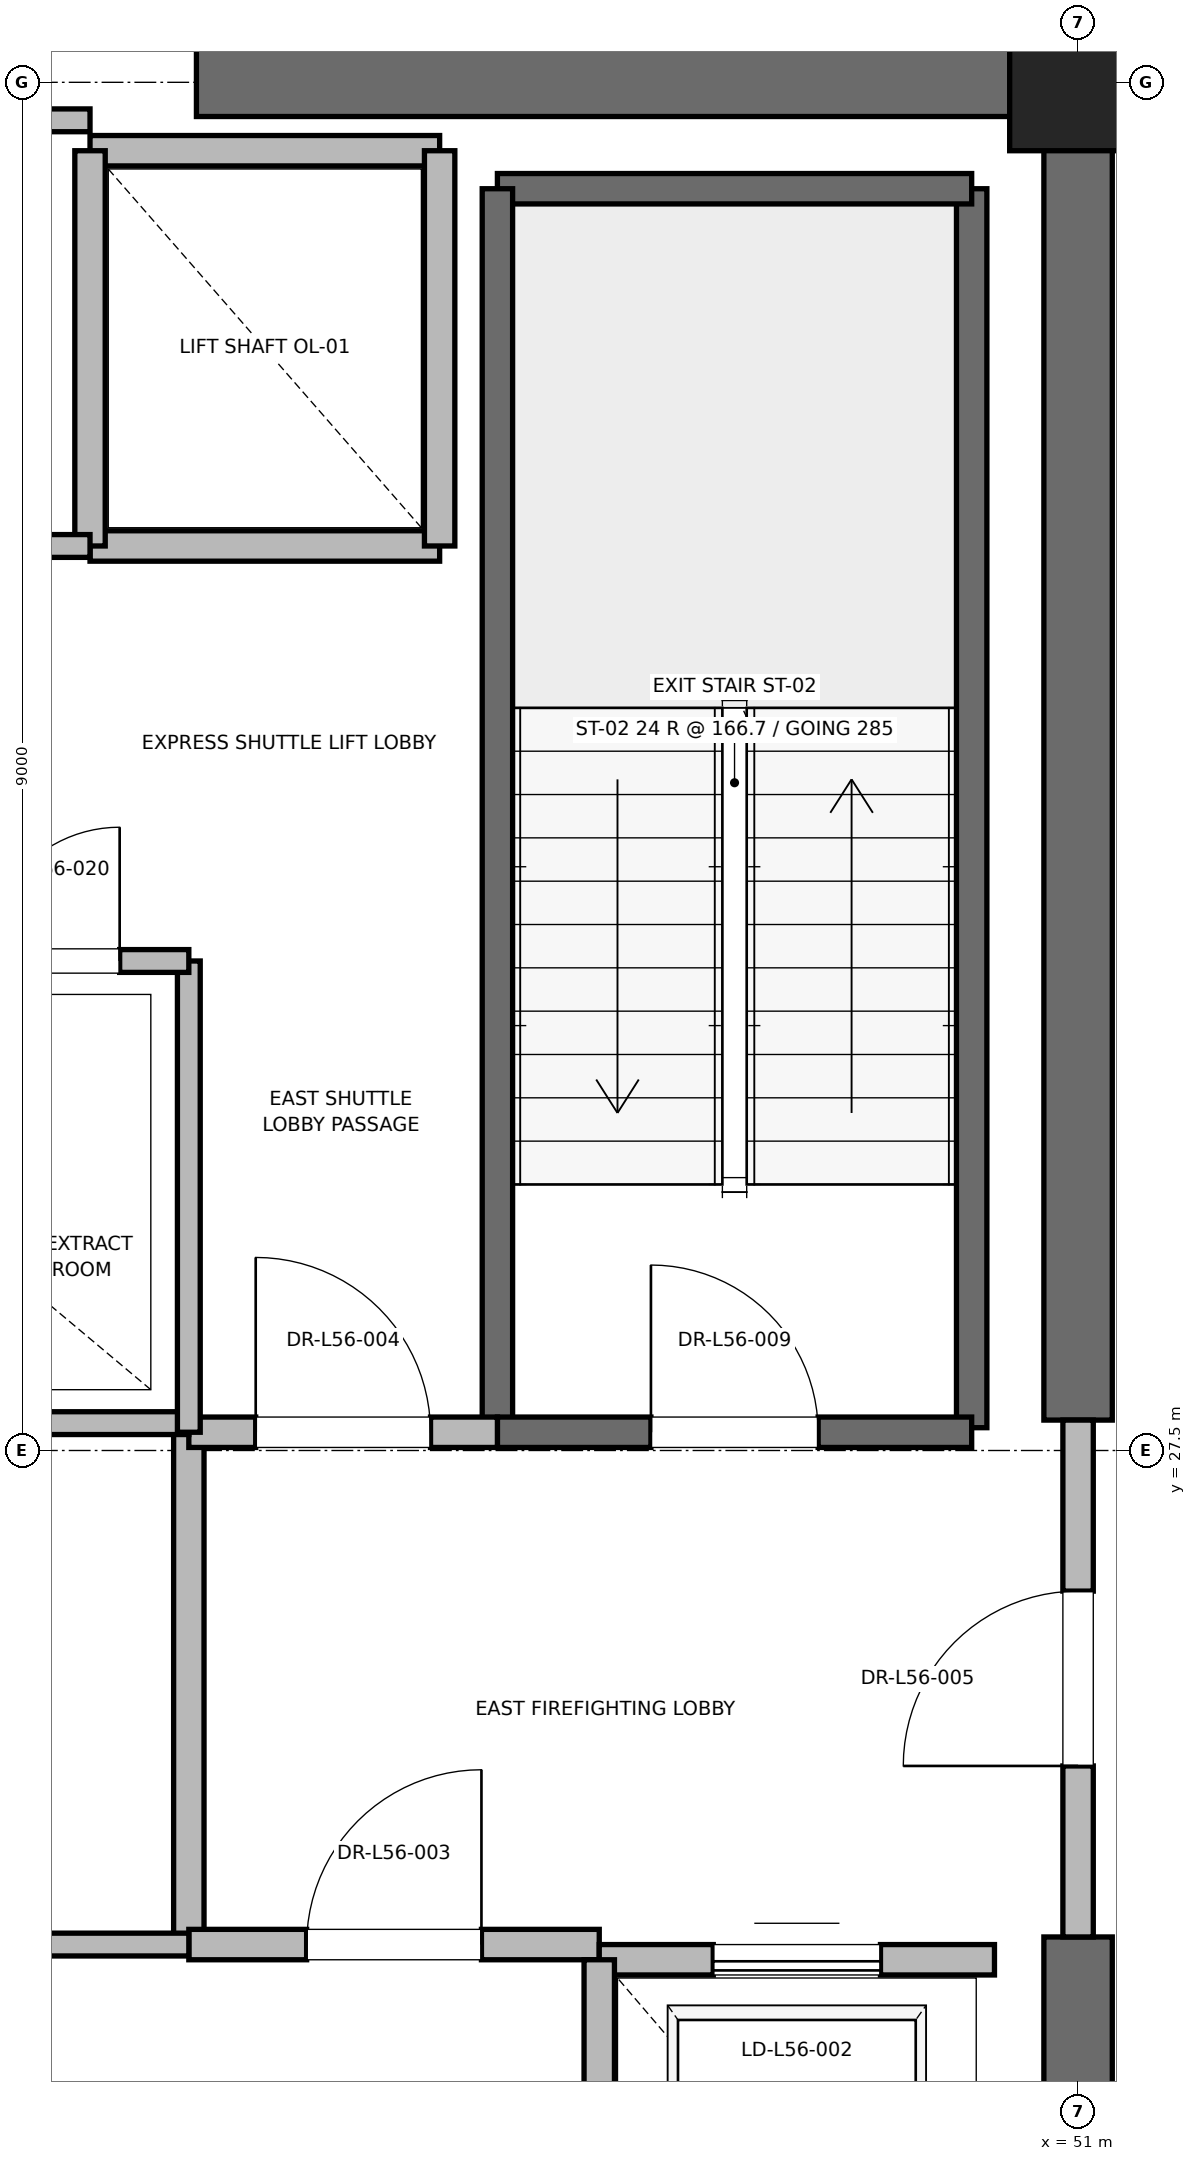
"""IFC4 building model, lengths in metres.
Left out: names, types, materials, properties, quantities, classifications, styles, units other than length and angle.
Written with IfcOpenShell. Run it as: python <this file> out.ifc"""

import sys

from ifc_helpers import new_model, si_unit, direction, frame, frame_2d, origin, origin_2d, place, context, subcontext, project, spatial, rectangle, extrude, element, fill, save


model = new_model("IFC4")
c1 = context("Model", 3, precision=1e-05, world=origin(), true_north=direction((0.0, 1.0)))
c2 = subcontext(c1, "Body", "Model", "MODEL_VIEW")
j1 = project(units=[si_unit("LENGTHUNIT", "METRE"), si_unit("PLANEANGLEUNIT", "RADIAN")], contexts=[c1])
p1 = place(None, origin())
s1 = spatial("IfcSite", under=j1, at=p1, CompositionType="ELEMENT")
p2 = place(p1, origin())
s2 = spatial("IfcBuilding", under=s1, at=p2, CompositionType="ELEMENT")
p3 = place(p2, frame((0.0, 0.0, 243.2)))
s3 = spatial("IfcBuildingStorey", under=s2, at=p3, CompositionType="ELEMENT", Elevation=243.2)
p4 = place(p3, frame((51.0, 36.5, 0.0), z_axis=(0.0, 0.0, 1.0), x_axis=(1.0, 0.0, 0.0)))
e1 = element("IfcColumn", 1, at=p4, inside=s3, PredefinedType="PILASTER", context=c2, shape_type="SweptSolid", body=[
    extrude(rectangle(XDim=0.9, YDim=0.9, at=origin_2d()), origin(), (0.0, 0.0, 1.0), 4.0),
])
for number, where, z_axis, x_axis in (
    (2, (45.2, 36.5, 0.0), (0.0, 0.0, 1.0), (1.0, 0.0, 0.0)),
    (3, (51.0, 18.5, 0.0), (0.0, 0.0, 1.0), (0.0, 1.0, 0.0)),
):
    element("IfcWall", number, at=place(p3, frame(where, z_axis=z_axis, x_axis=x_axis)), inside=s3, PredefinedType="SHEAR", context=c2, shape_type="SweptSolid", body=[
        extrude(rectangle(XDim=5.8, YDim=0.45, at=frame_2d((2.9, 0.0))), origin(), (0.0, 0.0, 1.0), 3.785),
    ])
p5 = place(p3, frame((51.0, 27.7, 0.0), z_axis=(0.0, 0.0, 1.0), x_axis=(0.0, 1.0, 0.0)))
e4 = element("IfcWall", 4, at=p5, inside=s3, PredefinedType="SHEAR", context=c2, shape_type="SweptSolid", body=[
    extrude(rectangle(XDim=8.8, YDim=0.45, at=frame_2d((4.4, 0.0))), origin(), (0.0, 0.0, 1.0), 3.785),
])
p6 = place(p3, frame((50.3, 27.65, 0.0), z_axis=(0.0, 0.0, 1.0), x_axis=(0.0, 1.0, 0.0)))
e5 = element("IfcWall", 5, at=p6, inside=s3, PredefinedType="SOLIDWALL", context=c2, shape_type="SweptSolid", body=[
    extrude(rectangle(XDim=8.15, YDim=0.2, at=frame_2d((4.075, 0.0))), origin(), (0.0, 0.0, 1.0), 3.785),
])
p7 = place(p3, frame((47.18, 35.8, 0.0), z_axis=(0.0, 0.0, 1.0), x_axis=(1.0, 0.0, 0.0)))
e6 = element("IfcWall", 6, at=p7, inside=s3, PredefinedType="SOLIDWALL", context=c2, shape_type="SweptSolid", body=[
    extrude(rectangle(XDim=3.12, YDim=0.2, at=frame_2d((1.56, 0.0))), origin(), (0.0, 0.0, 1.0), 3.785),
])
p8 = place(p3, frame((47.18, 27.62, 0.0), z_axis=(0.0, 0.0, 1.0), x_axis=(0.0, 1.0, 0.0)))
e7 = element("IfcWall", 7, at=p8, inside=s3, PredefinedType="SOLIDWALL", context=c2, shape_type="SweptSolid", body=[
    extrude(rectangle(XDim=8.18, YDim=0.2, at=frame_2d((4.09, 0.0))), origin(), (0.0, 0.0, 1.0), 3.785),
])
p9 = place(p3, frame((47.18, 27.62, 0.0), z_axis=(0.0, 0.0, 1.0), x_axis=(1.0, 0.0, 0.0)))
e8 = element("IfcWall", 8, at=p9, inside=s3, PredefinedType="SOLIDWALL", context=c2, shape_type="SweptSolid", body=[
    extrude(rectangle(XDim=3.12, YDim=0.2, at=frame_2d((1.56, 0.0))), origin(), (0.0, 0.0, 1.0), 3.785),
])
p10 = place(p9, frame((1.01, 0.0, 0.0)))
e9 = element("IfcOpeningElement", 9, at=p10, cuts=e8, PredefinedType="OPENING", context=c2, shape_type="SweptSolid", body=[
    extrude(rectangle(XDim=1.1, YDim=2.15, at=frame_2d((0.55, 1.075))), frame((0.0, 0.1, 0.0), z_axis=(0.0, -1.0, 0.0), x_axis=(1.0, 0.0, 0.0)), (0.0, 0.0, 1.0), 0.2),
])
p11 = place(p3, frame((45.15, 24.25, 0.0), z_axis=(0.0, 0.0, 1.0), x_axis=(0.0, 1.0, 0.0)))
e10 = element("IfcWall", 10, at=p11, inside=s3, PredefinedType="PARTITIONING", context=c2, shape_type="SweptSolid", body=[
    extrude(rectangle(XDim=3.37, YDim=0.2, at=frame_2d((1.685, 0.0))), origin(), (0.0, 0.0, 1.0), 3.785),
])
p12 = place(p3, frame((45.15, 24.25, 0.0), z_axis=(0.0, 0.0, 1.0), x_axis=(1.0, 0.0, 0.0)))
e11 = element("IfcWall", 11, at=p12, inside=s3, PredefinedType="PARTITIONING", context=c2, shape_type="SweptSolid", body=[
    extrude(rectangle(XDim=2.7, YDim=0.2, at=frame_2d((1.35, 0.0))), origin(), (0.0, 0.0, 1.0), 3.785),
])
p13 = place(p12, frame((0.775, 0.0, 0.0)))
e12 = element("IfcOpeningElement", 12, at=p13, cuts=e11, PredefinedType="OPENING", context=c2, shape_type="SweptSolid", body=[
    extrude(rectangle(XDim=1.15, YDim=2.2, at=frame_2d((0.575, 1.1))), frame((0.0, 0.1, 0.0), z_axis=(0.0, -1.0, 0.0), x_axis=(1.0, 0.0, 0.0)), (0.0, 0.0, 1.0), 0.2),
])
p14 = place(p3, frame((45.15, 27.62, 0.0), z_axis=(0.0, 0.0, 1.0), x_axis=(1.0, 0.0, 0.0)))
e13 = element("IfcWall", 13, at=p14, inside=s3, PredefinedType="PARTITIONING", context=c2, shape_type="SweptSolid", body=[
    extrude(rectangle(XDim=2.03, YDim=0.2, at=frame_2d((1.015, 0.0))), origin(), (0.0, 0.0, 1.0), 3.785),
])
p15 = place(p14, frame((0.44, 0.0, 0.0)))
e14 = element("IfcOpeningElement", 14, at=p15, cuts=e13, PredefinedType="OPENING", context=c2, shape_type="SweptSolid", body=[
    extrude(rectangle(XDim=1.15, YDim=2.2, at=frame_2d((0.575, 1.1))), frame((0.0, 0.1, 0.0), z_axis=(0.0, -1.0, 0.0), x_axis=(1.0, 0.0, 0.0)), (0.0, 0.0, 1.0), 0.2),
])
p16 = place(p3, frame((51.0, 24.3, 0.0), z_axis=(0.0, 0.0, 1.0), x_axis=(0.0, 1.0, 0.0)))
e15 = element("IfcWall", 15, at=p16, inside=s3, PredefinedType="PARTITIONING", context=c2, shape_type="SweptSolid", body=[
    extrude(rectangle(XDim=3.4, YDim=0.2, at=frame_2d((1.7, 0.0))), origin(), (0.0, 0.0, 1.0), 2.865),
])
p17 = place(p16, frame((1.125, 0.0, 0.0)))
e16 = element("IfcOpeningElement", 16, at=p17, cuts=e15, PredefinedType="OPENING", context=c2, shape_type="SweptSolid", body=[
    extrude(rectangle(XDim=1.15, YDim=2.2, at=frame_2d((0.575, 1.1))), frame((0.0, 0.1, 0.0), z_axis=(0.0, -1.0, 0.0), x_axis=(1.0, 0.0, 0.0)), (0.0, 0.0, 1.0), 0.2),
])
p18 = place(p3, frame((50.45, 24.15, 0.0), z_axis=(0.0, 0.0, 1.0), x_axis=(-1.0, 0.0, 0.0)))
e17 = element("IfcWall", 17, at=p18, inside=s3, PredefinedType="SOLIDWALL", context=c2, shape_type="SweptSolid", body=[
    extrude(rectangle(XDim=2.6, YDim=0.2, at=frame_2d((1.3, 0.0))), origin(), (0.0, 0.0, 1.0), 2.865),
])
p19 = place(p18, frame((0.75, 0.0, 0.0)))
e18 = element("IfcOpeningElement", 18, at=p19, cuts=e17, PredefinedType="OPENING", context=c2, shape_type="SweptSolid", body=[
    extrude(rectangle(XDim=1.1, YDim=2.2, at=frame_2d((0.55, 1.1))), frame((0.0, 0.1, 0.0), z_axis=(0.0, -1.0, 0.0), x_axis=(1.0, 0.0, 0.0)), (0.0, 0.0, 1.0), 0.2),
])
p20 = place(p3, frame((47.85, 24.15, 0.0), z_axis=(0.0, 0.0, 1.0), x_axis=(0.0, -1.0, 0.0)))
e19 = element("IfcWall", 19, at=p20, inside=s3, PredefinedType="SOLIDWALL", context=c2, shape_type="SweptSolid", body=[
    extrude(rectangle(XDim=3.0, YDim=0.2, at=frame_2d((1.5, 0.0))), origin(), (0.0, 0.0, 1.0), 3.785),
])
p21 = place(p3, frame((44.5, 33.45, 0.0), z_axis=(0.0, 0.0, 1.0), x_axis=(1.0, 0.0, 0.0)))
e20 = element("IfcWall", 20, at=p21, inside=s3, PredefinedType="SOLIDWALL", context=c2, shape_type="SweptSolid", body=[
    extrude(rectangle(XDim=2.3, YDim=0.2, at=frame_2d((1.15, 0.0))), origin(), (0.0, 0.0, 1.0), 3.785),
])
p22 = place(p3, frame((46.8, 36.05, 0.0), z_axis=(0.0, 0.0, 1.0), x_axis=(-1.0, 0.0, 0.0)))
e21 = element("IfcWall", 21, at=p22, inside=s3, PredefinedType="SOLIDWALL", context=c2, shape_type="SweptSolid", body=[
    extrude(rectangle(XDim=2.3, YDim=0.2, at=frame_2d((1.15, 0.0))), origin(), (0.0, 0.0, 1.0), 2.865),
])
p23 = place(p3, frame((44.5, 36.05, 0.0), z_axis=(0.0, 0.0, 1.0), x_axis=(0.0, -1.0, 0.0)))
e22 = element("IfcWall", 22, at=p23, inside=s3, PredefinedType="SOLIDWALL", context=c2, shape_type="SweptSolid", body=[
    extrude(rectangle(XDim=2.6, YDim=0.2, at=frame_2d((1.3, 0.0))), origin(), (0.0, 0.0, 1.0), 2.865),
])
p24 = place(p3, frame((46.8, 33.45, 0.0), z_axis=(0.0, 0.0, 1.0), x_axis=(0.0, 1.0, 0.0)))
e23 = element("IfcWall", 23, at=p24, inside=s3, PredefinedType="SOLIDWALL", context=c2, shape_type="SweptSolid", body=[
    extrude(rectangle(XDim=2.6, YDim=0.2, at=frame_2d((1.3, 0.0))), origin(), (0.0, 0.0, 1.0), 3.785),
])
p25 = place(p3, frame((41.56, 27.68, 0.0), z_axis=(0.0, 0.0, 1.0), x_axis=(1.0, 0.0, 0.0)))
e24 = element("IfcWall", 24, at=p25, inside=s3, PredefinedType="PARTITIONING", context=c2, shape_type="SweptSolid", body=[
    extrude(rectangle(XDim=3.59, YDim=0.15, at=frame_2d((1.795, 0.0))), origin(), (0.0, 0.0, 1.0), 2.85),
])
p26 = place(p3, frame((41.76, 24.25, 0.0), z_axis=(0.0, 0.0, 1.0), x_axis=(1.0, 0.0, 0.0)))
e25 = element("IfcWall", 25, at=p26, inside=s3, PredefinedType="PARTITIONING", context=c2, shape_type="SweptSolid", body=[
    extrude(rectangle(XDim=3.39, YDim=0.15, at=frame_2d((1.695, 0.0))), origin(), (0.0, 0.0, 1.0), 2.85),
])
p27 = place(p26, frame((1.255, 0.0, 0.0)))
e26 = element("IfcOpeningElement", 26, at=p27, cuts=e25, PredefinedType="OPENING", context=c2, shape_type="SweptSolid", body=[
    extrude(rectangle(XDim=0.88, YDim=2.1, at=frame_2d((0.44, 1.05))), frame((0.0, 0.075, 0.0), z_axis=(0.0, -1.0, 0.0), x_axis=(1.0, 0.0, 0.0)), (0.0, 0.0, 1.0), 0.15),
])
p28 = place(p3, frame((45.15, 27.62, 0.0), z_axis=(0.0, 0.0, 1.0), x_axis=(0.0, 1.0, 0.0)))
e27 = element("IfcWall", 27, at=p28, inside=s3, PredefinedType="PARTITIONING", context=c2, shape_type="SweptSolid", body=[
    extrude(rectangle(XDim=3.1, YDim=0.15, at=frame_2d((1.55, 0.0))), origin(), (0.0, 0.0, 1.0), 2.85),
])
p29 = place(p3, frame((43.36, 30.72, 0.0), z_axis=(0.0, 0.0, 1.0), x_axis=(1.0, 0.0, 0.0)))
e28 = element("IfcWall", 28, at=p29, inside=s3, PredefinedType="PARTITIONING", context=c2, shape_type="SweptSolid", body=[
    extrude(rectangle(XDim=1.79, YDim=0.15, at=frame_2d((0.895, 0.0))), origin(), (0.0, 0.0, 1.0), 2.85),
])
p30 = place(p29, frame((0.455, 0.0, 0.0)))
e29 = element("IfcOpeningElement", 29, at=p30, cuts=e28, PredefinedType="OPENING", context=c2, shape_type="SweptSolid", body=[
    extrude(rectangle(XDim=0.88, YDim=2.1, at=frame_2d((0.44, 1.05))), frame((0.0, 0.075, 0.0), z_axis=(0.0, -1.0, 0.0), x_axis=(1.0, 0.0, 0.0)), (0.0, 0.0, 1.0), 0.15),
])
p31 = place(p3, frame((41.56, 36.25, 0.0), z_axis=(0.0, 0.0, 1.0), x_axis=(1.0, 0.0, 0.0)))
e30 = element("IfcWall", 30, at=p31, inside=s3, PredefinedType="PARTITIONING", context=c2, shape_type="SweptSolid", body=[
    extrude(rectangle(XDim=2.94, YDim=0.15, at=frame_2d((1.47, 0.0))), origin(), (0.0, 0.0, 1.0), 2.85),
])
p32 = place(p3, frame((41.56, 33.45, 0.0), z_axis=(0.0, 0.0, 1.0), x_axis=(1.0, 0.0, 0.0)))
e31 = element("IfcWall", 31, at=p32, inside=s3, PredefinedType="PARTITIONING", context=c2, shape_type="SweptSolid", body=[
    extrude(rectangle(XDim=2.94, YDim=0.15, at=frame_2d((1.47, 0.0))), origin(), (0.0, 0.0, 1.0), 2.85),
])
p33 = place(p32, frame((1.03, 0.0, 0.0)))
e32 = element("IfcOpeningElement", 32, at=p33, cuts=e31, PredefinedType="OPENING", context=c2, shape_type="SweptSolid", body=[
    extrude(rectangle(XDim=0.88, YDim=2.1, at=frame_2d((0.44, 1.05))), frame((0.0, 0.075, 0.0), z_axis=(0.0, -1.0, 0.0), x_axis=(1.0, 0.0, 0.0)), (0.0, 0.0, 1.0), 0.15),
])
p34 = place(p10, origin())
e33 = element("IfcDoor", 33, at=p34, inside=s3, OperationType="SINGLE_SWING_LEFT", PredefinedType="DOOR", context=c2, shape_type="SweptSolid", body=[
    extrude(rectangle(XDim=1.1, YDim=2.15, at=frame_2d((0.55, 1.075))), frame((0.0, 0.025, 0.0), z_axis=(0.0, -1.0, 0.0), x_axis=(1.0, 0.0, 0.0)), (0.0, 0.0, 1.0), 0.05),
])
fill(e9, e33)
p35 = place(p13, origin())
e34 = element("IfcDoor", 34, at=p35, inside=s3, OperationType="SINGLE_SWING_RIGHT", PredefinedType="DOOR", context=c2, shape_type="SweptSolid", body=[
    extrude(rectangle(XDim=1.15, YDim=2.2, at=frame_2d((0.575, 1.1))), frame((0.0, 0.025, 0.0), z_axis=(0.0, -1.0, 0.0), x_axis=(1.0, 0.0, 0.0)), (0.0, 0.0, 1.0), 0.05),
])
fill(e12, e34)
p36 = place(p15, origin())
e35 = element("IfcDoor", 35, at=p36, inside=s3, OperationType="SINGLE_SWING_LEFT", PredefinedType="DOOR", context=c2, shape_type="SweptSolid", body=[
    extrude(rectangle(XDim=1.15, YDim=2.2, at=frame_2d((0.575, 1.1))), frame((0.0, 0.025, 0.0), z_axis=(0.0, -1.0, 0.0), x_axis=(1.0, 0.0, 0.0)), (0.0, 0.0, 1.0), 0.05),
])
fill(e14, e35)
p37 = place(p17, origin())
e36 = element("IfcDoor", 36, at=p37, inside=s3, OperationType="SINGLE_SWING_LEFT", PredefinedType="DOOR", context=c2, shape_type="SweptSolid", body=[
    extrude(rectangle(XDim=1.15, YDim=2.2, at=frame_2d((0.575, 1.1))), frame((0.0, 0.025, 0.0), z_axis=(0.0, -1.0, 0.0), x_axis=(1.0, 0.0, 0.0)), (0.0, 0.0, 1.0), 0.05),
])
fill(e16, e36)
p38 = place(p19, origin())
e37 = element("IfcDoor", 37, at=p38, inside=s3, OperationType="SLIDING_TO_RIGHT", PredefinedType="DOOR", context=c2, shape_type="SweptSolid", body=[
    extrude(rectangle(XDim=1.1, YDim=2.2, at=frame_2d((0.55, 1.1))), frame((0.0, 0.025, 0.0), z_axis=(0.0, -1.0, 0.0), x_axis=(1.0, 0.0, 0.0)), (0.0, 0.0, 1.0), 0.05),
])
fill(e18, e37)
p39 = place(p30, origin())
e38 = element("IfcDoor", 38, at=p39, inside=s3, OperationType="SINGLE_SWING_RIGHT", PredefinedType="DOOR", context=c2, shape_type="SweptSolid", body=[
    extrude(rectangle(XDim=0.88, YDim=2.1, at=frame_2d((0.44, 1.05))), frame((0.0, 0.025, 0.0), z_axis=(0.0, -1.0, 0.0), x_axis=(1.0, 0.0, 0.0)), (0.0, 0.0, 1.0), 0.05),
])
fill(e29, e38)
save(model, sys.argv[1])
